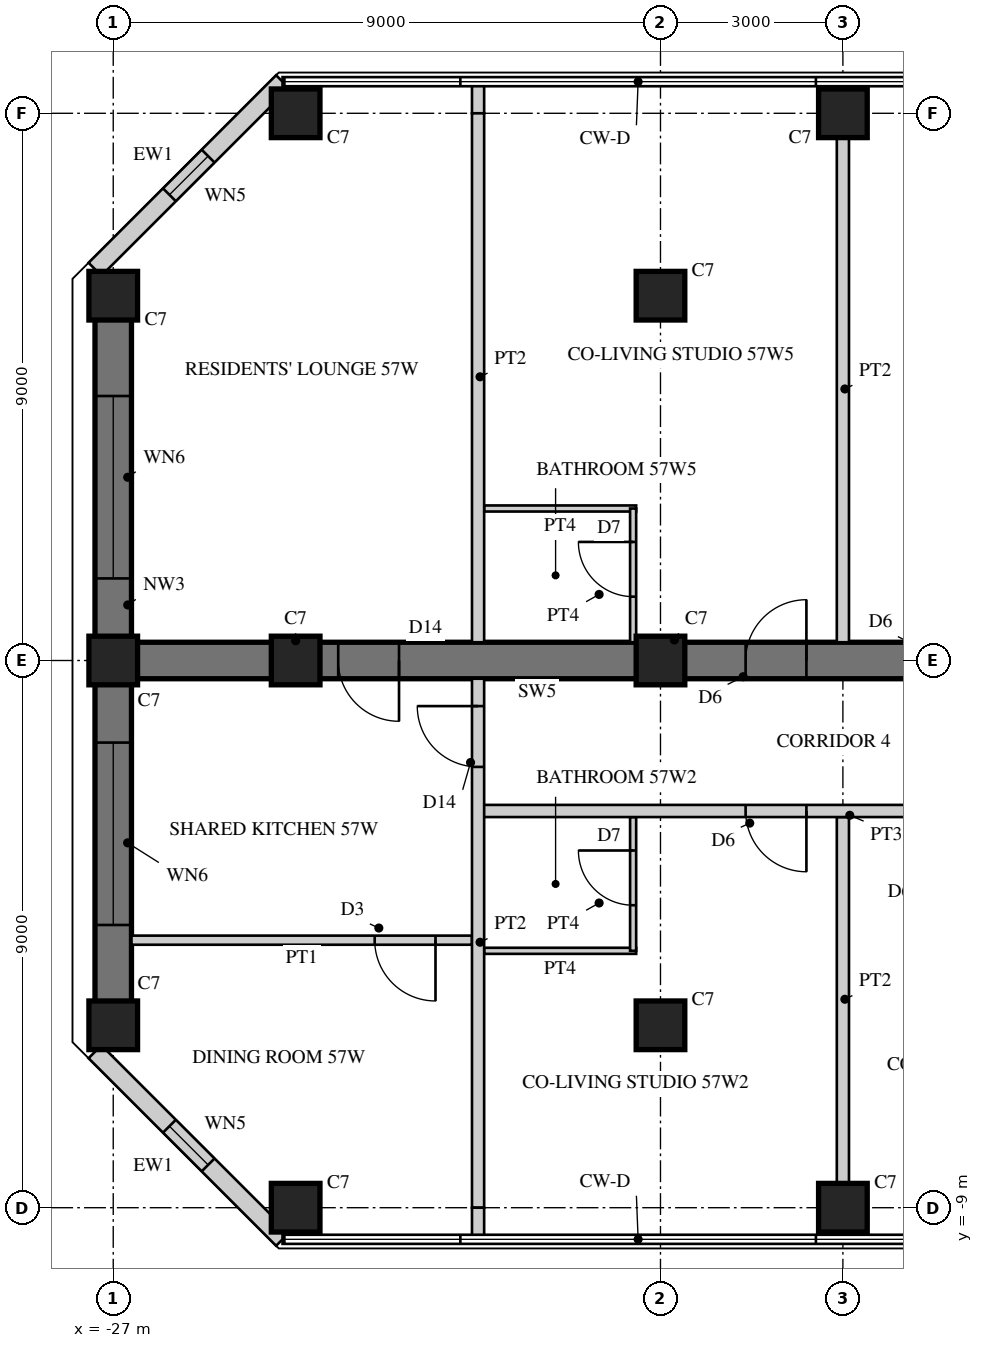
"""IFC4 building model, lengths in metres.
Left out: names, types, materials, properties, quantities, classifications, styles, units other than length and angle.
Written with IfcOpenShell. Run it as: python <this file> out.ifc"""

import sys

from ifc_helpers import new_model, si_unit, direction, frame, frame_2d, origin, origin_2d, place, context, subcontext, project, spatial, rectangle, hollow_rectangle, extrude, element, fill, save


model = new_model("IFC4")
c1 = context("Model", 3, precision=1e-05, world=origin(), true_north=direction((0.0, 1.0)))
c2 = subcontext(c1, "Body", "Model", "MODEL_VIEW")
j1 = project(units=[si_unit("LENGTHUNIT", "METRE"), si_unit("PLANEANGLEUNIT", "RADIAN")], contexts=[c1])
p1 = place(None, origin())
s1 = spatial("IfcSite", under=j1, at=p1, CompositionType="ELEMENT")
p2 = place(p1, origin())
s2 = spatial("IfcBuilding", under=s1, at=p2, CompositionType="ELEMENT")
p3 = place(p2, frame((0.0, 0.0, 225.5)))
s3 = spatial("IfcBuildingStorey", under=s2, at=p3, CompositionType="ELEMENT", Elevation=225.5)
p4 = place(p3, frame((-9.0, 0.0, 0.0), z_axis=(0.0, 0.0, 1.0), x_axis=(-1.0, 0.0, 0.0)))
e1 = element("IfcWall", 1, at=p4, inside=s3, PredefinedType="SHEAR", context=c2, shape_type="SweptSolid", body=[
    extrude(rectangle(XDim=18.0, YDim=0.6, at=frame_2d((9.0, 0.0))), origin(), (0.0, 0.0, 1.0), 3.4),
])
p5 = place(p4, frame((3.8, 0.0, 0.0)))
e2 = element("IfcOpeningElement", 2, at=p5, cuts=e1, PredefinedType="OPENING", context=c2, shape_type="SweptSolid", body=[
    extrude(rectangle(XDim=1.0, YDim=2.15, at=frame_2d((0.5, 1.075))), frame((0.0, 0.31, 0.0), z_axis=(0.0, -1.0, 0.0), x_axis=(1.0, 0.0, 0.0)), (0.0, 0.0, 1.0), 0.62),
])
p6 = place(p4, frame((6.6, 0.0, 0.0)))
e3 = element("IfcOpeningElement", 3, at=p6, cuts=e1, PredefinedType="OPENING", context=c2, shape_type="SweptSolid", body=[
    extrude(rectangle(XDim=1.0, YDim=2.15, at=frame_2d((0.5, 1.075))), frame((0.0, 0.31, 0.0), z_axis=(0.0, -1.0, 0.0), x_axis=(1.0, 0.0, 0.0)), (0.0, 0.0, 1.0), 0.62),
])
p7 = place(p4, frame((13.3, 0.0, 0.0)))
e4 = element("IfcOpeningElement", 4, at=p7, cuts=e1, PredefinedType="OPENING", context=c2, shape_type="SweptSolid", body=[
    extrude(rectangle(XDim=1.0, YDim=2.2, at=frame_2d((0.5, 1.1))), frame((0.0, 0.31, 0.0), z_axis=(0.0, -1.0, 0.0), x_axis=(1.0, 0.0, 0.0)), (0.0, 0.0, 1.0), 0.62),
])
p8 = place(p3, frame((-27.0, 6.0, 0.0), z_axis=(0.0, 0.0, 1.0), x_axis=(0.0, -1.0, 0.0)))
e5 = element("IfcWall", 5, at=p8, inside=s3, PredefinedType="SHEAR", context=c2, shape_type="SweptSolid", body=[
    extrude(rectangle(XDim=12.0, YDim=0.6, at=frame_2d((6.0, 0.0))), origin(), (0.0, 0.0, 1.0), 3.4),
])
p9 = place(p8, frame((1.65, 0.0, 0.6)))
e6 = element("IfcOpeningElement", 6, at=p9, cuts=e5, PredefinedType="OPENING", context=c2, shape_type="SweptSolid", body=[
    extrude(rectangle(XDim=3.0, YDim=2.4, at=frame_2d((1.5, 1.2))), frame((0.0, 0.31, 0.0), z_axis=(0.0, -1.0, 0.0), x_axis=(1.0, 0.0, 0.0)), (0.0, 0.0, 1.0), 0.62),
])
p10 = place(p8, frame((7.35, 0.0, 0.6)))
e7 = element("IfcOpeningElement", 7, at=p10, cuts=e5, PredefinedType="OPENING", context=c2, shape_type="SweptSolid", body=[
    extrude(rectangle(XDim=3.0, YDim=2.4, at=frame_2d((1.5, 1.2))), frame((0.0, 0.31, 0.0), z_axis=(0.0, -1.0, 0.0), x_axis=(1.0, 0.0, 0.0)), (0.0, 0.0, 1.0), 0.62),
])
for number, where, z_axis, x_axis in (
    (8, (-15.0, 9.0, 0.0), (0.0, 0.0, 1.0), (1.0, 0.0, 0.0)),
    (9, (-24.0, 9.0, 0.0), (0.0, 0.0, 1.0), (1.0, 0.0, 0.0)),
    (10, (-15.0, -9.0, 0.0), (0.0, 0.0, 1.0), (1.0, 0.0, 0.0)),
    (11, (-24.0, -9.0, 0.0), (0.0, 0.0, 1.0), (1.0, 0.0, 0.0)),
    (12, (-27.0, 6.0, 0.0), (0.0, 0.0, 1.0), (1.0, 0.0, 0.0)),
    (13, (-27.0, 0.0, 0.0), (0.0, 0.0, 1.0), (1.0, 0.0, 0.0)),
    (14, (-27.0, -6.0, 0.0), (0.0, 0.0, 1.0), (1.0, 0.0, 0.0)),
    (15, (-18.0, 6.0, 0.0), (0.0, 0.0, 1.0), (1.0, 0.0, 0.0)),
    (16, (-18.0, 0.0, 0.0), (0.0, 0.0, 1.0), (1.0, 0.0, 0.0)),
    (17, (-18.0, -6.0, 0.0), (0.0, 0.0, 1.0), (1.0, 0.0, 0.0)),
    (18, (-24.0, 0.0, 0.0), (0.0, 0.0, 1.0), (1.0, 0.0, 0.0)),
):
    element("IfcColumn", number, at=place(p3, frame(where, z_axis=z_axis, x_axis=x_axis)), inside=s3, PredefinedType="COLUMN", context=c2, shape_type="SweptSolid", body=[
        extrude(rectangle(XDim=0.8, YDim=0.8, at=origin_2d()), origin(), (0.0, 0.0, 1.0), 3.4),
    ])
p11 = place(p3, frame((-24.215, 9.52, 0.0), z_axis=(0.0, 0.0, 1.0), x_axis=(-0.707106781187, -0.707106781187, 0.0)))
e19 = element("IfcWall", 19, at=p11, inside=s3, PredefinedType="SOLIDWALL", context=c2, shape_type="SweptSolid", body=[
    extrude(rectangle(XDim=4.363, YDim=0.3, at=frame_2d((2.181, 0.0))), origin(), (0.0, 0.0, 1.0), 3.22),
])
p12 = place(p11, frame((1.731, 0.0, 0.3)))
e20 = element("IfcOpeningElement", 20, at=p12, cuts=e19, PredefinedType="OPENING", context=c2, shape_type="SweptSolid", body=[
    extrude(rectangle(XDim=0.9, YDim=2.4, at=frame_2d((0.45, 1.2))), frame((0.0, 0.16, 0.0), z_axis=(0.0, -1.0, 0.0), x_axis=(1.0, 0.0, 0.0)), (0.0, 0.0, 1.0), 0.32),
])
p13 = place(p3, frame((-27.3, -6.435, 0.0), z_axis=(0.0, 0.0, 1.0), x_axis=(0.707106781187, -0.707106781187, 0.0)))
e21 = element("IfcWall", 21, at=p13, inside=s3, PredefinedType="SOLIDWALL", context=c2, shape_type="SweptSolid", body=[
    extrude(rectangle(XDim=4.363, YDim=0.3, at=frame_2d((2.181, 0.0))), origin(), (0.0, 0.0, 1.0), 3.22),
])
p14 = place(p13, frame((1.731, 0.0, 0.3)))
e22 = element("IfcOpeningElement", 22, at=p14, cuts=e21, PredefinedType="OPENING", context=c2, shape_type="SweptSolid", body=[
    extrude(rectangle(XDim=0.9, YDim=2.4, at=frame_2d((0.45, 1.2))), frame((0.0, 0.16, 0.0), z_axis=(0.0, -1.0, 0.0), x_axis=(1.0, 0.0, 0.0)), (0.0, 0.0, 1.0), 0.32),
])
p15 = place(p3, frame((-15.0, -2.575, 0.0), z_axis=(0.0, 0.0, 1.0), x_axis=(0.0, -1.0, 0.0)))
e23 = element("IfcWall", 23, at=p15, inside=s3, PredefinedType="SOLIDWALL", context=c2, shape_type="SweptSolid", body=[
    extrude(rectangle(XDim=6.025, YDim=0.2, at=frame_2d((3.013, 0.0))), origin(), (0.0, 0.0, 1.0), 2.52),
])
p16 = place(p3, frame((-15.0, 8.6, 0.0), z_axis=(0.0, 0.0, 1.0), x_axis=(0.0, -1.0, 0.0)))
e24 = element("IfcWall", 24, at=p16, inside=s3, PredefinedType="SOLIDWALL", context=c2, shape_type="SweptSolid", body=[
    extrude(rectangle(XDim=8.3, YDim=0.2, at=frame_2d((4.15, 0.0))), origin(), (0.0, 0.0, 1.0), 2.52),
])
p17 = place(p3, frame((-18.4, -4.775, 0.0), z_axis=(0.0, 0.0, 1.0), x_axis=(-1.0, 0.0, 0.0)))
e25 = element("IfcWall", 25, at=p17, inside=s3, PredefinedType="PARTITIONING", context=c2, shape_type="SweptSolid", body=[
    extrude(rectangle(XDim=2.5, YDim=0.1, at=frame_2d((1.25, 0.0))), origin(), (0.0, 0.0, 1.0), 3.22),
])
p18 = place(p3, frame((-18.45, -2.575, 0.0), z_axis=(0.0, 0.0, 1.0), x_axis=(0.0, -1.0, 0.0)))
e26 = element("IfcWall", 26, at=p18, inside=s3, PredefinedType="PARTITIONING", context=c2, shape_type="SweptSolid", body=[
    extrude(rectangle(XDim=2.2, YDim=0.1, at=frame_2d((1.1, 0.0))), origin(), (0.0, 0.0, 1.0), 3.22),
])
p19 = place(p18, frame((0.55, 0.0, 0.0)))
e27 = element("IfcOpeningElement", 27, at=p19, cuts=e26, PredefinedType="OPENING", context=c2, shape_type="SweptSolid", body=[
    extrude(rectangle(XDim=0.9, YDim=2.1, at=frame_2d((0.45, 1.05))), frame((0.0, 0.06, 0.0), z_axis=(0.0, -1.0, 0.0), x_axis=(1.0, 0.0, 0.0)), (0.0, 0.0, 1.0), 0.12),
])
p20 = place(p3, frame((-18.4, 2.5, 0.0), z_axis=(0.0, 0.0, 1.0), x_axis=(-1.0, 0.0, 0.0)))
e28 = element("IfcWall", 28, at=p20, inside=s3, PredefinedType="PARTITIONING", context=c2, shape_type="SweptSolid", body=[
    extrude(rectangle(XDim=2.5, YDim=0.1, at=frame_2d((1.25, 0.0))), origin(), (0.0, 0.0, 1.0), 3.22),
])
p21 = place(p3, frame((-18.45, 2.5, 0.0), z_axis=(0.0, 0.0, 1.0), x_axis=(0.0, -1.0, 0.0)))
e29 = element("IfcWall", 29, at=p21, inside=s3, PredefinedType="PARTITIONING", context=c2, shape_type="SweptSolid", body=[
    extrude(rectangle(XDim=2.2, YDim=0.1, at=frame_2d((1.1, 0.0))), origin(), (0.0, 0.0, 1.0), 3.22),
])
p22 = place(p21, frame((0.55, 0.0, 0.0)))
e30 = element("IfcOpeningElement", 30, at=p22, cuts=e29, PredefinedType="OPENING", context=c2, shape_type="SweptSolid", body=[
    extrude(rectangle(XDim=0.9, YDim=2.1, at=frame_2d((0.45, 1.05))), frame((0.0, 0.06, 0.0), z_axis=(0.0, -1.0, 0.0), x_axis=(1.0, 0.0, 0.0)), (0.0, 0.0, 1.0), 0.12),
])
p23 = place(p3, frame((-9.4, -2.475, 0.0), z_axis=(0.0, 0.0, 1.0), x_axis=(-1.0, 0.0, 0.0)))
e31 = element("IfcWall", 31, at=p23, inside=s3, PredefinedType="SOLIDWALL", context=c2, shape_type="SweptSolid", body=[
    extrude(rectangle(XDim=11.6, YDim=0.2, at=frame_2d((5.8, 0.0))), origin(), (0.0, 0.0, 1.0), 3.22),
])
p24 = place(p23, frame((3.4, 0.0, 0.0)))
e32 = element("IfcOpeningElement", 32, at=p24, cuts=e31, PredefinedType="OPENING", context=c2, shape_type="SweptSolid", body=[
    extrude(rectangle(XDim=1.0, YDim=2.15, at=frame_2d((0.5, 1.075))), frame((0.0, 0.11, 0.0), z_axis=(0.0, -1.0, 0.0), x_axis=(1.0, 0.0, 0.0)), (0.0, 0.0, 1.0), 0.22),
])
p25 = place(p23, frame((6.2, 0.0, 0.0)))
e33 = element("IfcOpeningElement", 33, at=p25, cuts=e31, PredefinedType="OPENING", context=c2, shape_type="SweptSolid", body=[
    extrude(rectangle(XDim=1.0, YDim=2.15, at=frame_2d((0.5, 1.075))), frame((0.0, 0.11, 0.0), z_axis=(0.0, -1.0, 0.0), x_axis=(1.0, 0.0, 0.0)), (0.0, 0.0, 1.0), 0.22),
])
p26 = place(p3, frame((-21.1, -4.6, 0.0), z_axis=(0.0, 0.0, 1.0), x_axis=(-1.0, 0.0, 0.0)))
e34 = element("IfcWall", 34, at=p26, inside=s3, PredefinedType="PARTITIONING", context=c2, shape_type="SweptSolid", body=[
    extrude(rectangle(XDim=5.6, YDim=0.15, at=frame_2d((2.8, 0.0))), origin(), (0.0, 0.0, 1.0), 3.22),
])
p27 = place(p26, frame((0.6, 0.0, 0.0)))
e35 = element("IfcOpeningElement", 35, at=p27, cuts=e34, PredefinedType="OPENING", context=c2, shape_type="SweptSolid", body=[
    extrude(rectangle(XDim=1.0, YDim=2.1, at=frame_2d((0.5, 1.05))), frame((0.0, 0.085, 0.0), z_axis=(0.0, -1.0, 0.0), x_axis=(1.0, 0.0, 0.0)), (0.0, 0.0, 1.0), 0.17),
])
p28 = place(p3, frame((-21.0, 9.48, 0.0), z_axis=(0.0, 0.0, 1.0), x_axis=(0.0, -1.0, 0.0)))
e36 = element("IfcWall", 36, at=p28, inside=s3, PredefinedType="SOLIDWALL", context=c2, shape_type="SweptSolid", body=[
    extrude(rectangle(XDim=0.48, YDim=0.2, at=frame_2d((0.24, 0.0))), origin(), (0.0, 0.0, 1.0), 3.22),
])
p29 = place(p3, frame((-21.0, 9.0, 0.0), z_axis=(0.0, 0.0, 1.0), x_axis=(0.0, -1.0, 0.0)))
e37 = element("IfcWall", 37, at=p29, inside=s3, PredefinedType="SOLIDWALL", context=c2, shape_type="SweptSolid", body=[
    extrude(rectangle(XDim=8.7, YDim=0.2, at=frame_2d((4.35, 0.0))), origin(), (0.0, 0.0, 1.0), 2.67),
])
p30 = place(p3, frame((-21.0, -0.3, 0.0), z_axis=(0.0, 0.0, 1.0), x_axis=(0.0, -1.0, 0.0)))
e38 = element("IfcWall", 38, at=p30, inside=s3, PredefinedType="SOLIDWALL", context=c2, shape_type="SweptSolid", body=[
    extrude(rectangle(XDim=8.7, YDim=0.2, at=frame_2d((4.35, 0.0))), origin(), (0.0, 0.0, 1.0), 2.67),
])
p31 = place(p30, frame((0.45, 0.0, 0.0)))
e39 = element("IfcOpeningElement", 39, at=p31, cuts=e38, PredefinedType="OPENING", context=c2, shape_type="SweptSolid", body=[
    extrude(rectangle(XDim=1.0, YDim=2.2, at=frame_2d((0.5, 1.1))), frame((0.0, 0.11, 0.0), z_axis=(0.0, -1.0, 0.0), x_axis=(1.0, 0.0, 0.0)), (0.0, 0.0, 1.0), 0.22),
])
p32 = place(p3, frame((-21.0, -9.0, 0.0), z_axis=(0.0, 0.0, 1.0), x_axis=(0.0, -1.0, 0.0)))
e40 = element("IfcWall", 40, at=p32, inside=s3, PredefinedType="SOLIDWALL", context=c2, shape_type="SweptSolid", body=[
    extrude(rectangle(XDim=0.48, YDim=0.2, at=frame_2d((0.24, 0.0))), origin(), (0.0, 0.0, 1.0), 3.22),
])
p33 = place(p12, origin())
e41 = element("IfcWindow", 41, at=p33, inside=s3, PartitioningType="SINGLE_PANEL", PredefinedType="WINDOW", context=c2, shape_type="SweptSolid", body=[
    extrude(hollow_rectangle(XDim=0.9, YDim=2.4, WallThickness=0.06, at=frame_2d((0.45, 1.2))), frame((0.0, 0.03, 0.0), z_axis=(0.0, -1.0, 0.0), x_axis=(1.0, 0.0, 0.0)), (0.0, 0.0, 1.0), 0.06),
    extrude(rectangle(XDim=0.779, YDim=2.279, at=frame_2d((0.45, 1.2))), frame((0.0, 0.03, 0.0), z_axis=(0.0, -1.0, 0.0), x_axis=(1.0, 0.0, 0.0)), (0.0, 0.0, 1.0), 0.06),
])
fill(e20, e41)
p34 = place(p9, origin())
e42 = element("IfcWindow", 42, at=p34, inside=s3, PartitioningType="SINGLE_PANEL", PredefinedType="WINDOW", context=c2, shape_type="SweptSolid", body=[
    extrude(hollow_rectangle(XDim=3.0, YDim=2.4, WallThickness=0.06, at=frame_2d((1.5, 1.2))), frame((0.0, 0.03, 0.0), z_axis=(0.0, -1.0, 0.0), x_axis=(1.0, 0.0, 0.0)), (0.0, 0.0, 1.0), 0.06),
    extrude(rectangle(XDim=2.879, YDim=2.279, at=frame_2d((1.5, 1.2))), frame((0.0, 0.03, 0.0), z_axis=(0.0, -1.0, 0.0), x_axis=(1.0, 0.0, 0.0)), (0.0, 0.0, 1.0), 0.06),
])
fill(e6, e42)
p35 = place(p10, origin())
e43 = element("IfcWindow", 43, at=p35, inside=s3, PartitioningType="SINGLE_PANEL", PredefinedType="WINDOW", context=c2, shape_type="SweptSolid", body=[
    extrude(hollow_rectangle(XDim=3.0, YDim=2.4, WallThickness=0.06, at=frame_2d((1.5, 1.2))), frame((0.0, 0.03, 0.0), z_axis=(0.0, -1.0, 0.0), x_axis=(1.0, 0.0, 0.0)), (0.0, 0.0, 1.0), 0.06),
    extrude(rectangle(XDim=2.879, YDim=2.279, at=frame_2d((1.5, 1.2))), frame((0.0, 0.03, 0.0), z_axis=(0.0, -1.0, 0.0), x_axis=(1.0, 0.0, 0.0)), (0.0, 0.0, 1.0), 0.06),
])
fill(e7, e43)
p36 = place(p14, origin())
e44 = element("IfcWindow", 44, at=p36, inside=s3, PartitioningType="SINGLE_PANEL", PredefinedType="WINDOW", context=c2, shape_type="SweptSolid", body=[
    extrude(hollow_rectangle(XDim=0.9, YDim=2.4, WallThickness=0.06, at=frame_2d((0.45, 1.2))), frame((0.0, 0.03, 0.0), z_axis=(0.0, -1.0, 0.0), x_axis=(1.0, 0.0, 0.0)), (0.0, 0.0, 1.0), 0.06),
    extrude(rectangle(XDim=0.779, YDim=2.279, at=frame_2d((0.45, 1.2))), frame((0.0, 0.03, 0.0), z_axis=(0.0, -1.0, 0.0), x_axis=(1.0, 0.0, 0.0)), (0.0, 0.0, 1.0), 0.06),
])
fill(e22, e44)
p37 = place(p19, frame((0.9, 0.0, 0.0), z_axis=(0.0, 0.0, 1.0), x_axis=(-1.0, 0.0, 0.0)))
e45 = element("IfcDoor", 45, at=p37, inside=s3, OperationType="SINGLE_SWING_RIGHT", PredefinedType="DOOR", context=c2, shape_type="SweptSolid", body=[
    extrude(rectangle(XDim=0.9, YDim=2.1, at=frame_2d((0.45, 1.05))), frame((0.0, 0.025, 0.0), z_axis=(0.0, -1.0, 0.0), x_axis=(1.0, 0.0, 0.0)), (0.0, 0.0, 1.0), 0.05),
])
fill(e27, e45)
p38 = place(p22, frame((0.9, 0.0, 0.0), z_axis=(0.0, 0.0, 1.0), x_axis=(-1.0, 0.0, 0.0)))
e46 = element("IfcDoor", 46, at=p38, inside=s3, OperationType="SINGLE_SWING_RIGHT", PredefinedType="DOOR", context=c2, shape_type="SweptSolid", body=[
    extrude(rectangle(XDim=0.9, YDim=2.1, at=frame_2d((0.45, 1.05))), frame((0.0, 0.025, 0.0), z_axis=(0.0, -1.0, 0.0), x_axis=(1.0, 0.0, 0.0)), (0.0, 0.0, 1.0), 0.05),
])
fill(e30, e46)
p39 = place(p25, origin())
e47 = element("IfcDoor", 47, at=p39, inside=s3, OperationType="SINGLE_SWING_LEFT", PredefinedType="DOOR", context=c2, shape_type="SweptSolid", body=[
    extrude(rectangle(XDim=1.0, YDim=2.15, at=frame_2d((0.5, 1.075))), frame((0.0, 0.025, 0.0), z_axis=(0.0, -1.0, 0.0), x_axis=(1.0, 0.0, 0.0)), (0.0, 0.0, 1.0), 0.05),
])
fill(e33, e47)
p40 = place(p27, origin())
e48 = element("IfcDoor", 48, at=p40, inside=s3, OperationType="SINGLE_SWING_LEFT", PredefinedType="DOOR", context=c2, shape_type="SweptSolid", body=[
    extrude(rectangle(XDim=1.0, YDim=2.1, at=frame_2d((0.5, 1.05))), frame((0.0, 0.025, 0.0), z_axis=(0.0, -1.0, 0.0), x_axis=(1.0, 0.0, 0.0)), (0.0, 0.0, 1.0), 0.05),
])
fill(e35, e48)
p41 = place(p31, frame((1.0, 0.0, 0.0), z_axis=(0.0, 0.0, 1.0), x_axis=(-1.0, 0.0, 0.0)))
e49 = element("IfcDoor", 49, at=p41, inside=s3, OperationType="SINGLE_SWING_RIGHT", PredefinedType="DOOR", context=c2, shape_type="SweptSolid", body=[
    extrude(rectangle(XDim=1.0, YDim=2.2, at=frame_2d((0.5, 1.1))), frame((0.0, 0.025, 0.0), z_axis=(0.0, -1.0, 0.0), x_axis=(1.0, 0.0, 0.0)), (0.0, 0.0, 1.0), 0.05),
])
fill(e39, e49)
p42 = place(p6, frame((1.0, 0.0, 0.0), z_axis=(0.0, 0.0, 1.0), x_axis=(-1.0, 0.0, 0.0)))
e50 = element("IfcDoor", 50, at=p42, inside=s3, OperationType="SINGLE_SWING_RIGHT", PredefinedType="DOOR", context=c2, shape_type="SweptSolid", body=[
    extrude(rectangle(XDim=1.0, YDim=2.15, at=frame_2d((0.5, 1.075))), frame((0.0, 0.025, 0.0), z_axis=(0.0, -1.0, 0.0), x_axis=(1.0, 0.0, 0.0)), (0.0, 0.0, 1.0), 0.05),
])
fill(e3, e50)
p43 = place(p7, origin())
e51 = element("IfcDoor", 51, at=p43, inside=s3, OperationType="SINGLE_SWING_LEFT", PredefinedType="DOOR", context=c2, shape_type="SweptSolid", body=[
    extrude(rectangle(XDim=1.0, YDim=2.2, at=frame_2d((0.5, 1.1))), frame((0.0, 0.025, 0.0), z_axis=(0.0, -1.0, 0.0), x_axis=(1.0, 0.0, 0.0)), (0.0, 0.0, 1.0), 0.05),
])
fill(e4, e51)
save(model, sys.argv[1])
